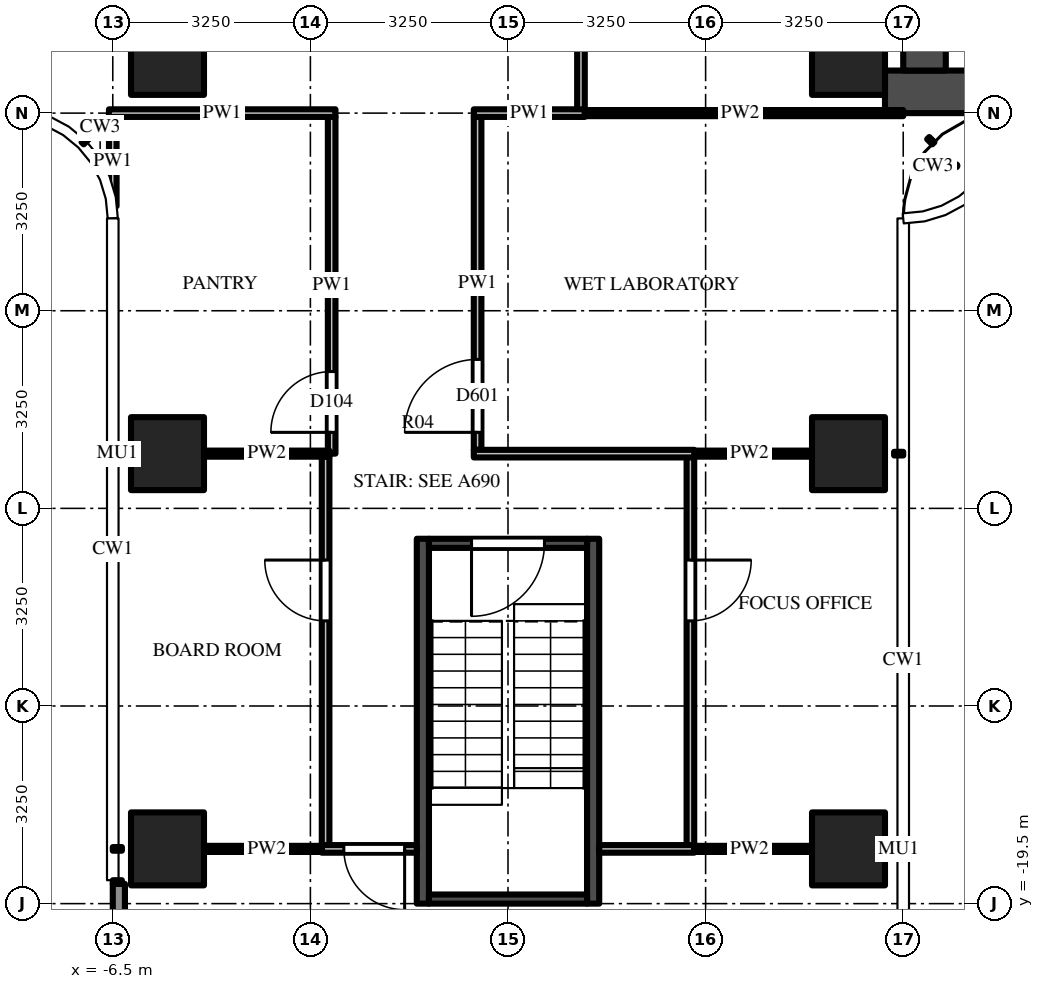
"""IFC4 building model, lengths in metres.
Left out: names, types, materials, properties, quantities, classifications, styles, units other than length and angle.
Written with IfcOpenShell. Run it as: python <this file> out.ifc"""

import sys

from ifc_helpers import new_model, si_unit, direction, frame, frame_2d, origin, origin_2d, place, context, subcontext, project, spatial, rectangle, extrude, source, transform, mapped, element, fill, save


model = new_model("IFC4")
c1 = context("Model", 3, precision=1e-05, world=origin(), true_north=direction((0.0, 1.0)))
c2 = subcontext(c1, "Body", "Model", "MODEL_VIEW")
j1 = project(units=[si_unit("LENGTHUNIT", "METRE"), si_unit("PLANEANGLEUNIT", "RADIAN")], contexts=[c1])
p1 = place(None, origin())
s1 = spatial("IfcSite", under=j1, at=p1, CompositionType="ELEMENT")
p2 = place(p1, origin())
s2 = spatial("IfcBuilding", under=s1, at=p2, CompositionType="ELEMENT")
p3 = place(p2, frame((0.0, 0.0, 208.8)))
s3 = spatial("IfcBuildingStorey", under=s2, at=p3, CompositionType="ELEMENT", Elevation=208.8)
m1 = source(origin(), c2, "Body", "SweptSolid", [
    extrude(rectangle(XDim=1.2, YDim=1.2, at=origin_2d()), origin(), (0.0, 0.0, 1.0), 3.9),
])
for number, where, z_axis, x_axis in (
    (1, (5.6, -5.6, 0.0), (0.0, 0.0, 1.0), (1.0, 0.0, 0.0)),
    (2, (-5.6, -5.6, 0.0), (0.0, 0.0, 1.0), (1.0, 0.0, 0.0)),
    (3, (5.6, -12.1, 0.0), (0.0, 0.0, 1.0), (1.0, 0.0, 0.0)),
    (4, (5.6, -18.6, 0.0), (0.0, 0.0, 1.0), (1.0, 0.0, 0.0)),
    (5, (-5.6, -12.1, 0.0), (0.0, 0.0, 1.0), (1.0, 0.0, 0.0)),
    (6, (-5.6, -18.6, 0.0), (0.0, 0.0, 1.0), (1.0, 0.0, 0.0)),
):
    element("IfcColumn", number, at=place(p3, frame(where, z_axis=z_axis, x_axis=x_axis)), inside=s3, PredefinedType="COLUMN", context=c2, shape_type="MappedRepresentation", body=[
        mapped(m1, transform((0.0, 0.0, 0.0))),
    ])
m2 = source(origin(), c2, "Body", "SweptSolid", [
    extrude(rectangle(XDim=16.55, YDim=0.7, at=frame_2d((8.275, 0.0))), origin(), (0.0, 0.0, 1.0), 3.45),
])
p4 = place(p3, frame((6.2, -6.15, 0.0), z_axis=(0.0, 0.0, 1.0), x_axis=(1.0, 0.0, 0.0)))
e7 = element("IfcWall", 7, at=p4, inside=s3, PredefinedType="SHEAR", context=c2, shape_type="MappedRepresentation", body=[
    mapped(m2, transform((0.0, 0.0, 0.0))),
])
m3 = source(origin(), c2, "Body", "SweptSolid", [
    extrude(rectangle(XDim=9.05, YDim=0.7, at=frame_2d((4.525, 0.0))), origin(), (0.0, 0.0, 1.0), 3.45),
])
p5 = place(p3, frame((6.85, -5.8, 0.0), z_axis=(0.0, 0.0, 1.0), x_axis=(0.0, 1.0, 0.0)))
e8 = element("IfcWall", 8, at=p5, inside=s3, PredefinedType="SHEAR", context=c2, shape_type="MappedRepresentation", body=[
    mapped(m3, transform((0.0, 0.0, 0.0))),
])
m4 = source(origin(), c2, "Body", "SweptSolid", [
    extrude(rectangle(XDim=1.8, YDim=2.1, at=frame_2d((0.9, 1.05))), frame((0.0, 0.36, 0.0), z_axis=(0.0, -1.0, 0.0), x_axis=(1.0, 0.0, 0.0)), (0.0, 0.0, 1.0), 0.72),
])
p6 = place(p5, frame((3.15, 0.0, 0.0)))
e9 = element("IfcOpeningElement", 9, at=p6, cuts=e8, PredefinedType="OPENING", context=c2, shape_type="MappedRepresentation", body=[
    mapped(m4, transform((0.0, 0.0, 0.0))),
])
m5 = source(origin(), c2, "Body", "SweptSolid", [
    extrude(rectangle(XDim=6.0, YDim=0.2, at=frame_2d((3.0, 0.0))), origin(), (0.0, 0.0, 1.0), 3.45),
])
for number, where, z_axis, x_axis in (
    (10, (1.4, -13.5, 0.0), (0.0, 0.0, 1.0), (0.0, -1.0, 0.0)),
    (11, (-1.4, -13.5, 0.0), (0.0, 0.0, 1.0), (0.0, -1.0, 0.0)),
):
    element("IfcWall", number, at=place(p3, frame(where, z_axis=z_axis, x_axis=x_axis)), inside=s3, PredefinedType="SHEAR", context=c2, shape_type="MappedRepresentation", body=[
        mapped(m5, transform((0.0, 0.0, 0.0))),
    ])
m6 = source(origin(), c2, "Body", "SweptSolid", [
    extrude(rectangle(XDim=2.6, YDim=0.15, at=frame_2d((1.3, 0.0))), origin(), (0.0, 0.0, 1.0), 3.45),
])
p7 = place(p3, frame((1.3, -13.575, 0.0), z_axis=(0.0, 0.0, 1.0), x_axis=(-1.0, 0.0, 0.0)))
e12 = element("IfcWall", 12, at=p7, inside=s3, PredefinedType="SHEAR", context=c2, shape_type="MappedRepresentation", body=[
    mapped(m6, transform((0.0, 0.0, 0.0))),
])
m7 = source(origin(), c2, "Body", "SweptSolid", [
    extrude(rectangle(XDim=1.2, YDim=2.1, at=frame_2d((0.6, 1.05))), frame((0.0, 0.085, 0.0), z_axis=(0.0, -1.0, 0.0), x_axis=(1.0, 0.0, 0.0)), (0.0, 0.0, 1.0), 0.17),
])
p8 = place(p7, frame((0.7, 0.0, 0.0)))
e13 = element("IfcOpeningElement", 13, at=p8, cuts=e12, PredefinedType="OPENING", context=c2, shape_type="MappedRepresentation", body=[
    mapped(m7, transform((0.0, 0.0, 0.0))),
])
p9 = place(p3, frame((1.3, -19.425, 0.0), z_axis=(0.0, 0.0, 1.0), x_axis=(-1.0, 0.0, 0.0)))
e14 = element("IfcWall", 14, at=p9, inside=s3, PredefinedType="SHEAR", context=c2, shape_type="MappedRepresentation", body=[
    mapped(m6, transform((0.0, 0.0, 0.0))),
])
m8 = source(origin(), c2, "Body", "SweptSolid", [
    extrude(rectangle(XDim=3.0, YDim=0.2, at=frame_2d((1.5, 0.0))), origin(), (0.0, 0.0, 1.0), 3.45),
])
p10 = place(p3, frame((-6.4, -19.175, 0.0), z_axis=(0.0, 0.0, 1.0), x_axis=(0.0, -1.0, 0.0)))
e15 = element("IfcWall", 15, at=p10, inside=s3, PredefinedType="SOLIDWALL", context=c2, shape_type="MappedRepresentation", body=[
    mapped(m8, transform((0.0, 0.0, 0.0))),
])
m9 = source(origin(), c2, "Body", "SweptSolid", [
    extrude(rectangle(XDim=1.8, YDim=2.4, at=frame_2d((0.9, 1.2))), frame((0.0, 0.11, 0.0), z_axis=(0.0, -1.0, 0.0), x_axis=(1.0, 0.0, 0.0)), (0.0, 0.0, 1.0), 0.22),
])
p11 = place(p10, frame((0.6, 0.0, 0.0)))
e16 = element("IfcOpeningElement", 16, at=p11, cuts=e15, PredefinedType="OPENING", context=c2, shape_type="MappedRepresentation", body=[
    mapped(m9, transform((0.0, 0.0, 0.0))),
])
m10 = source(origin(), c2, "Body", "SweptSolid", [
    extrude(rectangle(XDim=1.469, YDim=0.125, at=frame_2d((0.734, 0.0))), origin(), (0.0, 0.0, 1.0), 3.45),
])
p12 = place(p3, frame((-6.5, -6.562, 0.0), z_axis=(0.0, 0.0, 1.0), x_axis=(0.0, -1.0, 0.0)))
e17 = element("IfcWall", 17, at=p12, inside=s3, PredefinedType="PARTITIONING", context=c2, shape_type="MappedRepresentation", body=[
    mapped(m10, transform((0.0, 0.0, 0.0))),
])
m11 = source(origin(), c2, "Body", "SweptSolid", [
    extrude(rectangle(XDim=6.4, YDim=0.125, at=frame_2d((3.2, 0.0))), origin(), (0.0, 0.0, 1.0), 2.668),
])
p13 = place(p3, frame((-3.0, -18.55, 0.0), z_axis=(0.0, 0.0, 1.0), x_axis=(0.0, 1.0, 0.0)))
e18 = element("IfcWall", 18, at=p13, inside=s3, PredefinedType="PARTITIONING", context=c2, shape_type="MappedRepresentation", body=[
    mapped(m11, transform((0.0, 0.0, 0.0))),
])
m12 = source(origin(), c2, "Body", "SweptSolid", [
    extrude(rectangle(XDim=1.0, YDim=2.1, at=frame_2d((0.5, 1.05))), frame((0.0, 0.073, 0.0), z_axis=(0.0, -1.0, 0.0), x_axis=(1.0, 0.0, 0.0)), (0.0, 0.0, 1.0), 0.145),
])
p14 = place(p13, frame((3.7, 0.0, 0.0)))
e19 = element("IfcOpeningElement", 19, at=p14, cuts=e18, PredefinedType="OPENING", context=c2, shape_type="MappedRepresentation", body=[
    mapped(m12, transform((0.0, 0.0, 0.0))),
])
m13 = source(origin(), c2, "Body", "SweptSolid", [
    extrude(rectangle(XDim=5.538, YDim=0.125, at=frame_2d((2.769, 0.0))), origin(), (0.0, 0.0, 1.0), 2.668),
])
p15 = place(p3, frame((-2.9, -12.1, 0.0), z_axis=(0.0, 0.0, 1.0), x_axis=(0.0, 1.0, 0.0)))
e20 = element("IfcWall", 20, at=p15, inside=s3, PredefinedType="PARTITIONING", context=c2, shape_type="MappedRepresentation", body=[
    mapped(m13, transform((0.0, 0.0, 0.0))),
])
p16 = place(p15, frame((0.35, 0.0, 0.0)))
e21 = element("IfcOpeningElement", 21, at=p16, cuts=e20, PredefinedType="OPENING", context=c2, shape_type="MappedRepresentation", body=[
    mapped(m12, transform((0.0, 0.0, 0.0))),
])
m14 = source(origin(), c2, "Body", "SweptSolid", [
    extrude(rectangle(XDim=5.475, YDim=0.125, at=frame_2d((2.738, 0.0))), origin(), (0.0, 0.0, 1.0), 2.668),
])
p17 = place(p3, frame((-0.5, -12.038, 0.0), z_axis=(0.0, 0.0, 1.0), x_axis=(0.0, 1.0, 0.0)))
e22 = element("IfcWall", 22, at=p17, inside=s3, PredefinedType="PARTITIONING", context=c2, shape_type="MappedRepresentation", body=[
    mapped(m14, transform((0.0, 0.0, 0.0))),
])
m15 = source(origin(), c2, "Body", "SweptSolid", [
    extrude(rectangle(XDim=1.2, YDim=2.1, at=frame_2d((0.6, 1.05))), frame((0.0, 0.073, 0.0), z_axis=(0.0, -1.0, 0.0), x_axis=(1.0, 0.0, 0.0)), (0.0, 0.0, 1.0), 0.145),
])
p18 = place(p17, frame((0.288, 0.0, 0.0)))
e23 = element("IfcOpeningElement", 23, at=p18, cuts=e22, PredefinedType="OPENING", context=c2, shape_type="MappedRepresentation", body=[
    mapped(m15, transform((0.0, 0.0, 0.0))),
])
m16 = source(origin(), c2, "Body", "SweptSolid", [
    extrude(rectangle(XDim=3.137, YDim=0.125, at=frame_2d((1.569, 0.0))), origin(), (0.0, 0.0, 1.0), 2.668),
])
p19 = place(p3, frame((1.2, -3.312, 0.0), z_axis=(0.0, 0.0, 1.0), x_axis=(0.0, -1.0, 0.0)))
e24 = element("IfcWall", 24, at=p19, inside=s3, PredefinedType="PARTITIONING", context=c2, shape_type="MappedRepresentation", body=[
    mapped(m16, transform((0.0, 0.0, 0.0))),
])
p20 = place(p3, frame((3.0, -12.15, 0.0), z_axis=(0.0, 0.0, 1.0), x_axis=(0.0, -1.0, 0.0)))
e25 = element("IfcWall", 25, at=p20, inside=s3, PredefinedType="PARTITIONING", context=c2, shape_type="MappedRepresentation", body=[
    mapped(m11, transform((0.0, 0.0, 0.0))),
])
p21 = place(p20, frame((1.7, 0.0, 0.0)))
e26 = element("IfcOpeningElement", 26, at=p21, cuts=e25, PredefinedType="OPENING", context=c2, shape_type="MappedRepresentation", body=[
    mapped(m12, transform((0.0, 0.0, 0.0))),
])
m17 = source(origin(), c2, "Body", "SweptSolid", [
    extrude(rectangle(XDim=2.062, YDim=0.1, at=frame_2d((1.031, 0.0))), origin(), (0.0, 0.0, 1.0), 2.897),
])
for number, where, z_axis, x_axis in (
    (27, (-5.0, -18.6, 0.0), (0.0, 0.0, 1.0), (1.0, 0.0, 0.0)),
    (28, (2.938, -18.6, 0.0), (0.0, 0.0, 1.0), (1.0, 0.0, 0.0)),
):
    element("IfcWall", number, at=place(p3, frame(where, z_axis=z_axis, x_axis=x_axis)), inside=s3, PredefinedType="PARTITIONING", context=c2, shape_type="MappedRepresentation", body=[
        mapped(m17, transform((0.0, 0.0, 0.0))),
    ])
m18 = source(origin(), c2, "Body", "SweptSolid", [
    extrude(rectangle(XDim=1.562, YDim=0.125, at=frame_2d((0.781, 0.0))), origin(), (0.0, 0.0, 1.0), 2.897),
])
p22 = place(p3, frame((-1.5, -18.6, 0.0), z_axis=(0.0, 0.0, 1.0), x_axis=(-1.0, 0.0, 0.0)))
e29 = element("IfcWall", 29, at=p22, inside=s3, PredefinedType="PARTITIONING", context=c2, shape_type="MappedRepresentation", body=[
    mapped(m18, transform((0.0, 0.0, 0.0))),
])
p23 = place(p22, frame((0.2, 0.0, 0.0)))
e30 = element("IfcOpeningElement", 30, at=p23, cuts=e29, PredefinedType="OPENING", context=c2, shape_type="MappedRepresentation", body=[
    mapped(m12, transform((0.0, 0.0, 0.0))),
])
p24 = place(p3, frame((3.062, -18.6, 0.0), z_axis=(0.0, 0.0, 1.0), x_axis=(-1.0, 0.0, 0.0)))
e31 = element("IfcWall", 31, at=p24, inside=s3, PredefinedType="PARTITIONING", context=c2, shape_type="MappedRepresentation", body=[
    mapped(m18, transform((0.0, 0.0, 0.0))),
])
m19 = source(origin(), c2, "Body", "SweptSolid", [
    extrude(rectangle(XDim=2.062, YDim=0.1, at=frame_2d((1.031, 0.0))), origin(), (0.0, 0.0, 1.0), 2.668),
])
for number, where, z_axis, x_axis in (
    (32, (-5.0, -12.1, 0.0), (0.0, 0.0, 1.0), (1.0, 0.0, 0.0)),
    (33, (2.938, -12.1, 0.0), (0.0, 0.0, 1.0), (1.0, 0.0, 0.0)),
):
    element("IfcWall", number, at=place(p3, frame(where, z_axis=z_axis, x_axis=x_axis)), inside=s3, PredefinedType="PARTITIONING", context=c2, shape_type="MappedRepresentation", body=[
        mapped(m19, transform((0.0, 0.0, 0.0))),
    ])
m20 = source(origin(), c2, "Body", "SweptSolid", [
    extrude(rectangle(XDim=3.625, YDim=0.125, at=frame_2d((1.812, 0.0))), origin(), (0.0, 0.0, 1.0), 2.668),
])
p25 = place(p3, frame((-0.562, -12.1, 0.0), z_axis=(0.0, 0.0, 1.0), x_axis=(1.0, 0.0, 0.0)))
e34 = element("IfcWall", 34, at=p25, inside=s3, PredefinedType="PARTITIONING", context=c2, shape_type="MappedRepresentation", body=[
    mapped(m20, transform((0.0, 0.0, 0.0))),
])
p26 = place(p3, frame((1.137, -6.5, 0.0), z_axis=(0.0, 0.0, 1.0), x_axis=(1.0, 0.0, 0.0)))
e35 = element("IfcWall", 35, at=p26, inside=s3, PredefinedType="PARTITIONING", context=c2, shape_type="SweptSolid", body=[
    extrude(rectangle(XDim=5.363, YDim=0.1, at=frame_2d((2.681, 0.0))), origin(), (0.0, 0.0, 1.0), 2.53),
])
m21 = source(origin(), c2, "Body", "SweptSolid", [
    extrude(rectangle(XDim=3.725, YDim=0.125, at=frame_2d((1.863, 0.0))), origin(), (0.0, 0.0, 1.0), 2.53),
])
p27 = place(p3, frame((-2.837, -6.5, 0.0), z_axis=(0.0, 0.0, 1.0), x_axis=(-1.0, 0.0, 0.0)))
e36 = element("IfcWall", 36, at=p27, inside=s3, PredefinedType="PARTITIONING", context=c2, shape_type="MappedRepresentation", body=[
    mapped(m21, transform((0.0, 0.0, 0.0))),
])
m22 = source(origin(), c2, "Body", "SweptSolid", [
    extrude(rectangle(XDim=1.825, YDim=0.125, at=frame_2d((0.913, 0.0))), origin(), (0.0, 0.0, 1.0), 3.45),
])
p28 = place(p3, frame((1.262, -6.5, 0.0), z_axis=(0.0, 0.0, 1.0), x_axis=(-1.0, 0.0, 0.0)))
e37 = element("IfcWall", 37, at=p28, inside=s3, PredefinedType="PARTITIONING", context=c2, shape_type="MappedRepresentation", body=[
    mapped(m22, transform((0.0, 0.0, 0.0))),
])
m23 = source(origin(), c2, "Body", "SweptSolid", [
    extrude(rectangle(XDim=1.2, YDim=2.1, at=frame_2d((0.6, 1.05))), frame((0.0, 0.025, 0.0), z_axis=(0.0, -1.0, 0.0), x_axis=(1.0, 0.0, 0.0)), (0.0, 0.0, 1.0), 0.05),
])
p29 = place(p8, origin())
e38 = element("IfcDoor", 38, at=p29, inside=s3, OperationType="SINGLE_SWING_RIGHT", PredefinedType="DOOR", context=c2, shape_type="MappedRepresentation", body=[
    mapped(m23, transform((0.0, 0.0, 0.0))),
])
fill(e13, e38)
m24 = source(origin(), c2, "Body", "SweptSolid", [
    extrude(rectangle(XDim=1.0, YDim=2.1, at=frame_2d((0.5, 1.05))), frame((0.0, 0.025, 0.0), z_axis=(0.0, -1.0, 0.0), x_axis=(1.0, 0.0, 0.0)), (0.0, 0.0, 1.0), 0.05),
])
p30 = place(p23, origin())
e39 = element("IfcDoor", 39, at=p30, inside=s3, OperationType="SINGLE_SWING_LEFT", PredefinedType="DOOR", context=c2, shape_type="MappedRepresentation", body=[
    mapped(m24, transform((0.0, 0.0, 0.0))),
])
fill(e30, e39)
p31 = place(p14, origin())
e40 = element("IfcDoor", 40, at=p31, inside=s3, OperationType="SINGLE_SWING_RIGHT", PredefinedType="DOOR", context=c2, shape_type="MappedRepresentation", body=[
    mapped(m24, transform((0.0, 0.0, 0.0))),
])
fill(e19, e40)
p32 = place(p21, origin())
e41 = element("IfcDoor", 41, at=p32, inside=s3, OperationType="SINGLE_SWING_LEFT", PredefinedType="DOOR", context=c2, shape_type="MappedRepresentation", body=[
    mapped(m24, transform((0.0, 0.0, 0.0))),
])
fill(e26, e41)
p33 = place(p16, origin())
e42 = element("IfcDoor", 42, at=p33, inside=s3, OperationType="SINGLE_SWING_LEFT", PredefinedType="DOOR", context=c2, shape_type="MappedRepresentation", body=[
    mapped(m24, transform((0.0, 0.0, 0.0))),
])
fill(e21, e42)
p34 = place(p18, origin())
e43 = element("IfcDoor", 43, at=p34, inside=s3, OperationType="SINGLE_SWING_LEFT", PredefinedType="DOOR", context=c2, shape_type="MappedRepresentation", body=[
    mapped(m23, transform((0.0, 0.0, 0.0))),
])
fill(e23, e43)
save(model, sys.argv[1])
